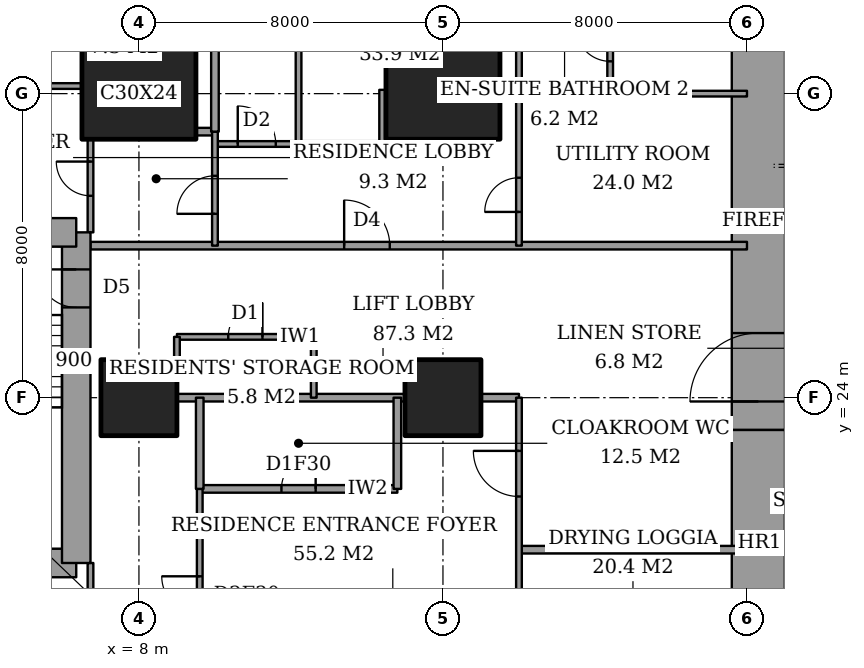
"""IFC4 building model, lengths in metres.
Left out: names, types, materials, properties, quantities, classifications, styles, units other than length and angle.
Written with IfcOpenShell. Run it as: python <this file> out.ifc"""

import sys

from ifc_helpers import new_model, si_unit, direction, frame, frame_2d, origin, origin_2d, place, context, subcontext, project, spatial, rectangle, extrude, element, fill, save


model = new_model("IFC4")
c1 = context("Model", 3, precision=1e-05, world=origin(), true_north=direction((0.0, 1.0)))
c2 = subcontext(c1, "Body", "Model", "MODEL_VIEW")
j1 = project(units=[si_unit("LENGTHUNIT", "METRE"), si_unit("PLANEANGLEUNIT", "RADIAN")], contexts=[c1])
p1 = place(None, origin())
s1 = spatial("IfcSite", under=j1, at=p1, CompositionType="ELEMENT")
p2 = place(p1, origin())
s2 = spatial("IfcBuilding", under=s1, at=p2, CompositionType="ELEMENT")
p3 = place(p2, frame((0.0, 0.0, 80.0)))
s3 = spatial("IfcBuildingStorey", under=s2, at=p3, CompositionType="ELEMENT", Elevation=80.0)
p4 = place(p3, frame((8.0, 24.0, 0.0), z_axis=(0.0, 0.0, 1.0), x_axis=(1.0, 0.0, 0.0)))
e1 = element("IfcColumn", 1, at=p4, inside=s3, PredefinedType="COLUMN", context=c2, shape_type="SweptSolid", body=[
    extrude(rectangle(XDim=2.0, YDim=2.0, at=origin_2d()), origin(), (0.0, 0.0, 1.0), 3.6),
])
p5 = place(p3, frame((8.0, 32.0, 0.0), z_axis=(0.0, 0.0, 1.0), x_axis=(1.0, 0.0, 0.0)))
e2 = element("IfcColumn", 2, at=p5, inside=s3, PredefinedType="COLUMN", context=c2, shape_type="SweptSolid", body=[
    extrude(rectangle(XDim=3.0, YDim=2.4, at=origin_2d()), origin(), (0.0, 0.0, 1.0), 3.6),
])
p6 = place(p3, frame((16.0, 24.0, 0.0), z_axis=(0.0, 0.0, 1.0), x_axis=(1.0, 0.0, 0.0)))
e3 = element("IfcColumn", 3, at=p6, inside=s3, PredefinedType="COLUMN", context=c2, shape_type="SweptSolid", body=[
    extrude(rectangle(XDim=2.0, YDim=2.0, at=origin_2d()), origin(), (0.0, 0.0, 1.0), 3.6),
])
p7 = place(p3, frame((16.0, 32.0, 0.0), z_axis=(0.0, 0.0, 1.0), x_axis=(1.0, 0.0, 0.0)))
e4 = element("IfcColumn", 4, at=p7, inside=s3, PredefinedType="COLUMN", context=c2, shape_type="SweptSolid", body=[
    extrude(rectangle(XDim=3.0, YDim=2.4, at=origin_2d()), origin(), (0.0, 0.0, 1.0), 3.6),
])
p8 = place(p3, frame((24.3, 13.0, 0.0), z_axis=(0.0, 0.0, 1.0), x_axis=(0.0, 1.0, 0.0)))
e5 = element("IfcWall", 5, at=p8, inside=s3, PredefinedType="SHEAR", context=c2, shape_type="SweptSolid", body=[
    extrude(rectangle(XDim=10.15, YDim=1.4, at=frame_2d((5.075, 0.0))), origin(), (0.0, 0.0, 1.0), 3.6),
])
p9 = place(p3, frame((24.3, 23.15, 0.0), z_axis=(0.0, 0.0, 1.0), x_axis=(0.0, 1.0, 0.0)))
e6 = element("IfcWall", 6, at=p9, inside=s3, PredefinedType="SHEAR", context=c2, shape_type="SweptSolid", body=[
    extrude(rectangle(XDim=11.85, YDim=1.4, at=frame_2d((5.925, 0.0))), origin(), (0.0, 0.0, 1.0), 3.6),
])
p10 = place(p9, frame((0.75, 0.0, 0.0)))
e7 = element("IfcOpeningElement", 7, at=p10, cuts=e6, PredefinedType="OPENING", context=c2, shape_type="SweptSolid", body=[
    extrude(rectangle(XDim=1.8, YDim=2.4, at=frame_2d((0.9, 1.2))), frame((0.0, 0.71, 0.0), z_axis=(0.0, -1.0, 0.0), x_axis=(1.0, 0.0, 0.0)), (0.0, 0.0, 1.0), 1.42),
])
p11 = place(p3, frame((1.9, 19.65, 0.0), z_axis=(0.0, 0.0, 1.0), x_axis=(1.0, 0.0, 0.0)))
e8 = element("IfcWall", 8, at=p11, inside=s3, PredefinedType="SHEAR", context=c2, shape_type="SweptSolid", body=[
    extrude(rectangle(XDim=4.45, YDim=0.75, at=frame_2d((2.225, 0.0))), origin(), (0.0, 0.0, 1.0), 3.6),
])
p12 = place(p3, frame((6.35, 19.65, 0.0), z_axis=(0.0, 0.0, 1.0), x_axis=(0.0, 1.0, 0.0)))
e9 = element("IfcWall", 9, at=p12, inside=s3, PredefinedType="SHEAR", context=c2, shape_type="SweptSolid", body=[
    extrude(rectangle(XDim=8.7, YDim=0.75, at=frame_2d((4.35, 0.0))), origin(), (0.0, 0.0, 1.0), 3.6),
])
p13 = place(p12, frame((6.725, 0.0, 0.0)))
e10 = element("IfcOpeningElement", 10, at=p13, cuts=e9, PredefinedType="OPENING", context=c2, shape_type="SweptSolid", body=[
    extrude(rectangle(XDim=1.0, YDim=2.1, at=frame_2d((0.5, 1.05))), frame((0.0, 0.385, 0.0), z_axis=(0.0, -1.0, 0.0), x_axis=(1.0, 0.0, 0.0)), (0.0, 0.0, 1.0), 0.77),
])
p14 = place(p3, frame((6.35, 28.35, 0.0), z_axis=(0.0, 0.0, 1.0), x_axis=(-1.0, 0.0, 0.0)))
e11 = element("IfcWall", 11, at=p14, inside=s3, PredefinedType="SHEAR", context=c2, shape_type="SweptSolid", body=[
    extrude(rectangle(XDim=4.45, YDim=0.75, at=frame_2d((2.225, 0.0))), origin(), (0.0, 0.0, 1.0), 3.6),
])
p15 = place(p3, frame((18.0, 20.0, 0.0), z_axis=(0.0, 0.0, 1.0), x_axis=(1.0, 0.0, 0.0)))
e12 = element("IfcWall", 12, at=p15, inside=s3, PredefinedType="PARTITIONING", context=c2, shape_type="SweptSolid", body=[
    extrude(rectangle(XDim=6.0, YDim=0.2, at=frame_2d((3.0, 0.0))), origin(), (0.0, 0.0, 1.0), 3.35),
])
p16 = place(p3, frame((9.6, 21.6, 0.0), z_axis=(0.0, 0.0, 1.0), x_axis=(1.0, 0.0, 0.0)))
e13 = element("IfcWall", 13, at=p16, inside=s3, PredefinedType="PARTITIONING", context=c2, shape_type="SweptSolid", body=[
    extrude(rectangle(XDim=5.2, YDim=0.2, at=frame_2d((2.6, 0.0))), origin(), (0.0, 0.0, 1.0), 3.35),
])
p17 = place(p16, frame((2.15, 0.0, 0.0)))
e14 = element("IfcOpeningElement", 14, at=p17, cuts=e13, PredefinedType="OPENING", context=c2, shape_type="SweptSolid", body=[
    extrude(rectangle(XDim=0.9, YDim=2.1, at=frame_2d((0.45, 1.05))), frame((0.0, 0.11, 0.0), z_axis=(0.0, -1.0, 0.0), x_axis=(1.0, 0.0, 0.0)), (0.0, 0.0, 1.0), 0.22),
])
p18 = place(p3, frame((9.0, 24.0, 0.0), z_axis=(0.0, 0.0, 1.0), x_axis=(1.0, 0.0, 0.0)))
e15 = element("IfcWall", 15, at=p18, inside=s3, PredefinedType="PARTITIONING", context=c2, shape_type="SweptSolid", body=[
    extrude(rectangle(XDim=6.0, YDim=0.2, at=frame_2d((3.0, 0.0))), origin(), (0.0, 0.0, 1.0), 3.35),
])
p19 = place(p3, frame((17.0, 24.0, 0.0), z_axis=(0.0, 0.0, 1.0), x_axis=(1.0, 0.0, 0.0)))
e16 = element("IfcWall", 16, at=p19, inside=s3, PredefinedType="PARTITIONING", context=c2, shape_type="SweptSolid", body=[
    extrude(rectangle(XDim=1.0, YDim=0.2, at=frame_2d((0.5, 0.0))), origin(), (0.0, 0.0, 1.0), 3.35),
])
p20 = place(p3, frame((9.0, 25.6, 0.0), z_axis=(0.0, 0.0, 1.0), x_axis=(1.0, 0.0, 0.0)))
e17 = element("IfcWall", 17, at=p20, inside=s3, PredefinedType="PARTITIONING", context=c2, shape_type="SweptSolid", body=[
    extrude(rectangle(XDim=3.6, YDim=0.15, at=frame_2d((1.8, 0.0))), origin(), (0.0, 0.0, 1.0), 3.35),
])
p21 = place(p20, frame((1.35, 0.0, 0.0)))
e18 = element("IfcOpeningElement", 18, at=p21, cuts=e17, PredefinedType="OPENING", context=c2, shape_type="SweptSolid", body=[
    extrude(rectangle(XDim=0.9, YDim=2.1, at=frame_2d((0.45, 1.05))), frame((0.0, 0.085, 0.0), z_axis=(0.0, -1.0, 0.0), x_axis=(1.0, 0.0, 0.0)), (0.0, 0.0, 1.0), 0.17),
])
p22 = place(p3, frame((6.725, 28.0, 0.0), z_axis=(0.0, 0.0, 1.0), x_axis=(1.0, 0.0, 0.0)))
e19 = element("IfcWall", 19, at=p22, inside=s3, PredefinedType="PARTITIONING", context=c2, shape_type="SweptSolid", body=[
    extrude(rectangle(XDim=17.275, YDim=0.2, at=frame_2d((8.637, 0.0))), origin(), (0.0, 0.0, 1.0), 3.35),
])
p23 = place(p22, frame((6.675, 0.0, 0.0)))
e20 = element("IfcOpeningElement", 20, at=p23, cuts=e19, PredefinedType="OPENING", context=c2, shape_type="SweptSolid", body=[
    extrude(rectangle(XDim=1.2, YDim=2.4, at=frame_2d((0.6, 1.2))), frame((0.0, 0.11, 0.0), z_axis=(0.0, -1.0, 0.0), x_axis=(1.0, 0.0, 0.0)), (0.0, 0.0, 1.0), 0.22),
])
p24 = place(p3, frame((10.0, 30.675, 0.0), z_axis=(0.0, 0.0, 1.0), x_axis=(1.0, 0.0, 0.0)))
e21 = element("IfcWall", 21, at=p24, inside=s3, PredefinedType="PARTITIONING", context=c2, shape_type="SweptSolid", body=[
    extrude(rectangle(XDim=4.4, YDim=0.15, at=frame_2d((2.2, 0.0))), origin(), (0.0, 0.0, 1.0), 3.35),
])
p25 = place(p24, frame((0.6, 0.0, 0.0)))
e22 = element("IfcOpeningElement", 22, at=p25, cuts=e21, PredefinedType="OPENING", context=c2, shape_type="SweptSolid", body=[
    extrude(rectangle(XDim=1.0, YDim=2.1, at=frame_2d((0.5, 1.05))), frame((0.0, 0.085, 0.0), z_axis=(0.0, -1.0, 0.0), x_axis=(1.0, 0.0, 0.0)), (0.0, 0.0, 1.0), 0.17),
])
p26 = place(p3, frame((9.5, 31.0, 0.0), z_axis=(0.0, 0.0, 1.0), x_axis=(1.0, 0.0, 0.0)))
e23 = element("IfcWall", 23, at=p26, inside=s3, PredefinedType="PARTITIONING", context=c2, shape_type="SweptSolid", body=[
    extrude(rectangle(XDim=0.5, YDim=0.2, at=frame_2d((0.25, 0.0))), origin(), (0.0, 0.0, 1.0), 3.35),
])
p27 = place(p3, frame((18.0, 32.0, 0.0), z_axis=(0.0, 0.0, 1.0), x_axis=(1.0, 0.0, 0.0)))
e24 = element("IfcWall", 24, at=p27, inside=s3, PredefinedType="PARTITIONING", context=c2, shape_type="SweptSolid", body=[
    extrude(rectangle(XDim=6.0, YDim=0.15, at=frame_2d((3.0, 0.0))), origin(), (0.0, 0.0, 1.0), 2.634),
])
p28 = place(p3, frame((17.5, 32.1, 0.0), z_axis=(0.0, 0.0, 1.0), x_axis=(1.0, 0.0, 0.0)))
e25 = element("IfcWall", 25, at=p28, inside=s3, PredefinedType="PARTITIONING", context=c2, shape_type="SweptSolid", body=[
    extrude(rectangle(XDim=0.5, YDim=0.15, at=frame_2d((0.25, 0.0))), origin(), (0.0, 0.0, 1.0), 2.634),
])
p29 = place(p3, frame((1.35, 32.2, 0.0), z_axis=(0.0, 0.0, 1.0), x_axis=(1.0, 0.0, 0.0)))
e26 = element("IfcWall", 26, at=p29, inside=s3, PredefinedType="PARTITIONING", context=c2, shape_type="SweptSolid", body=[
    extrude(rectangle(XDim=5.15, YDim=0.15, at=frame_2d((2.575, 0.0))), origin(), (0.0, 0.0, 1.0), 3.35),
])
p30 = place(p3, frame((6.725, 17.2, 0.0), z_axis=(0.0, 0.0, 1.0), x_axis=(0.0, 1.0, 0.0)))
e27 = element("IfcWall", 27, at=p30, inside=s3, PredefinedType="PARTITIONING", context=c2, shape_type="SweptSolid", body=[
    extrude(rectangle(XDim=2.45, YDim=0.15, at=frame_2d((1.225, 0.0))), origin(), (0.0, 0.0, 1.0), 3.35),
])
p31 = place(p30, frame((0.538, 0.0, 0.0)))
e28 = element("IfcOpeningElement", 28, at=p31, cuts=e27, PredefinedType="OPENING", context=c2, shape_type="SweptSolid", body=[
    extrude(rectangle(XDim=1.0, YDim=2.1, at=frame_2d((0.5, 1.05))), frame((0.0, 0.085, 0.0), z_axis=(0.0, -1.0, 0.0), x_axis=(1.0, 0.0, 0.0)), (0.0, 0.0, 1.0), 0.17),
])
p32 = place(p3, frame((6.725, 28.35, 0.0), z_axis=(0.0, 0.0, 1.0), x_axis=(0.0, 1.0, 0.0)))
e29 = element("IfcWall", 29, at=p32, inside=s3, PredefinedType="PARTITIONING", context=c2, shape_type="SweptSolid", body=[
    extrude(rectangle(XDim=2.45, YDim=0.15, at=frame_2d((1.225, 0.0))), origin(), (0.0, 0.0, 1.0), 3.35),
])
p33 = place(p32, frame((0.962, 0.0, 0.0)))
e30 = element("IfcOpeningElement", 30, at=p33, cuts=e29, PredefinedType="OPENING", context=c2, shape_type="SweptSolid", body=[
    extrude(rectangle(XDim=0.9, YDim=2.1, at=frame_2d((0.45, 1.05))), frame((0.0, 0.085, 0.0), z_axis=(0.0, -1.0, 0.0), x_axis=(1.0, 0.0, 0.0)), (0.0, 0.0, 1.0), 0.17),
])
p34 = place(p3, frame((9.0, 25.0, 0.0), z_axis=(0.0, 0.0, 1.0), x_axis=(0.0, 1.0, 0.0)))
e31 = element("IfcWall", 31, at=p34, inside=s3, PredefinedType="PARTITIONING", context=c2, shape_type="SweptSolid", body=[
    extrude(rectangle(XDim=0.6, YDim=0.15, at=frame_2d((0.3, 0.0))), origin(), (0.0, 0.0, 1.0), 3.35),
])
p35 = place(p3, frame((9.6, 21.6, 0.0), z_axis=(0.0, 0.0, 1.0), x_axis=(0.0, 1.0, 0.0)))
e32 = element("IfcWall", 32, at=p35, inside=s3, PredefinedType="PARTITIONING", context=c2, shape_type="SweptSolid", body=[
    extrude(rectangle(XDim=2.4, YDim=0.2, at=frame_2d((1.2, 0.0))), origin(), (0.0, 0.0, 1.0), 3.35),
])
p36 = place(p3, frame((9.6, 10.6, 0.0), z_axis=(0.0, 0.0, 1.0), x_axis=(0.0, 1.0, 0.0)))
e33 = element("IfcWall", 33, at=p36, inside=s3, PredefinedType="PARTITIONING", context=c2, shape_type="SweptSolid", body=[
    extrude(rectangle(XDim=11.0, YDim=0.15, at=frame_2d((5.5, 0.0))), origin(), (0.0, 0.0, 1.0), 3.35),
])
p37 = place(p36, frame((7.7, 0.0, 0.0)))
e34 = element("IfcOpeningElement", 34, at=p37, cuts=e33, PredefinedType="OPENING", context=c2, shape_type="SweptSolid", body=[
    extrude(rectangle(XDim=1.0, YDim=2.1, at=frame_2d((0.5, 1.05))), frame((0.0, 0.085, 0.0), z_axis=(0.0, -1.0, 0.0), x_axis=(1.0, 0.0, 0.0)), (0.0, 0.0, 1.0), 0.17),
])
p38 = place(p3, frame((10.0, 31.0, 0.0), z_axis=(0.0, 0.0, 1.0), x_axis=(0.0, 1.0, 0.0)))
e35 = element("IfcWall", 35, at=p38, inside=s3, PredefinedType="PARTITIONING", context=c2, shape_type="SweptSolid", body=[
    extrude(rectangle(XDim=6.4, YDim=0.2, at=frame_2d((3.2, 0.0))), origin(), (0.0, 0.0, 1.0), 3.35),
])
p39 = place(p3, frame((10.0, 28.0, 0.0), z_axis=(0.0, 0.0, 1.0), x_axis=(0.0, 1.0, 0.0)))
e36 = element("IfcWall", 36, at=p39, inside=s3, PredefinedType="PARTITIONING", context=c2, shape_type="SweptSolid", body=[
    extrude(rectangle(XDim=3.0, YDim=0.15, at=frame_2d((1.5, 0.0))), origin(), (0.0, 0.0, 1.0), 3.35),
])
p40 = place(p39, frame((0.837, 0.0, 0.0)))
e37 = element("IfcOpeningElement", 37, at=p40, cuts=e36, PredefinedType="OPENING", context=c2, shape_type="SweptSolid", body=[
    extrude(rectangle(XDim=1.0, YDim=2.1, at=frame_2d((0.5, 1.05))), frame((0.0, 0.085, 0.0), z_axis=(0.0, -1.0, 0.0), x_axis=(1.0, 0.0, 0.0)), (0.0, 0.0, 1.0), 0.17),
])
p41 = place(p3, frame((12.2, 30.675, 0.0), z_axis=(0.0, 0.0, 1.0), x_axis=(0.0, 1.0, 0.0)))
e38 = element("IfcWall", 38, at=p41, inside=s3, PredefinedType="PARTITIONING", context=c2, shape_type="SweptSolid", body=[
    extrude(rectangle(XDim=6.725, YDim=0.15, at=frame_2d((3.362, 0.0))), origin(), (0.0, 0.0, 1.0), 3.35),
])
p42 = place(p3, frame((12.6, 24.0, 0.0), z_axis=(0.0, 0.0, 1.0), x_axis=(0.0, 1.0, 0.0)))
e39 = element("IfcWall", 39, at=p42, inside=s3, PredefinedType="PARTITIONING", context=c2, shape_type="SweptSolid", body=[
    extrude(rectangle(XDim=1.6, YDim=0.15, at=frame_2d((0.8, 0.0))), origin(), (0.0, 0.0, 1.0), 3.35),
])
p43 = place(p3, frame((14.4, 30.675, 0.0), z_axis=(0.0, 0.0, 1.0), x_axis=(0.0, 1.0, 0.0)))
e40 = element("IfcWall", 40, at=p43, inside=s3, PredefinedType="PARTITIONING", context=c2, shape_type="SweptSolid", body=[
    extrude(rectangle(XDim=1.425, YDim=0.15, at=frame_2d((0.712, 0.0))), origin(), (0.0, 0.0, 1.0), 3.35),
])
p44 = place(p3, frame((14.8, 21.6, 0.0), z_axis=(0.0, 0.0, 1.0), x_axis=(0.0, 1.0, 0.0)))
e41 = element("IfcWall", 41, at=p44, inside=s3, PredefinedType="PARTITIONING", context=c2, shape_type="SweptSolid", body=[
    extrude(rectangle(XDim=2.4, YDim=0.2, at=frame_2d((1.2, 0.0))), origin(), (0.0, 0.0, 1.0), 3.35),
])
p45 = place(p3, frame((18.0, 10.6, 0.0), z_axis=(0.0, 0.0, 1.0), x_axis=(0.0, 1.0, 0.0)))
e42 = element("IfcWall", 42, at=p45, inside=s3, PredefinedType="PARTITIONING", context=c2, shape_type="SweptSolid", body=[
    extrude(rectangle(XDim=13.4, YDim=0.15, at=frame_2d((6.7, 0.0))), origin(), (0.0, 0.0, 1.0), 3.35),
])
p46 = place(p45, frame((10.8, 0.0, 0.0)))
e43 = element("IfcOpeningElement", 43, at=p46, cuts=e42, PredefinedType="OPENING", context=c2, shape_type="SweptSolid", body=[
    extrude(rectangle(XDim=1.2, YDim=2.4, at=frame_2d((0.6, 1.2))), frame((0.0, 0.085, 0.0), z_axis=(0.0, -1.0, 0.0), x_axis=(1.0, 0.0, 0.0)), (0.0, 0.0, 1.0), 0.17),
])
p47 = place(p45, frame((7.25, 0.0, 0.0)))
e44 = element("IfcOpeningElement", 44, at=p47, cuts=e42, PredefinedType="OPENING", context=c2, shape_type="SweptSolid", body=[
    extrude(rectangle(XDim=0.9, YDim=2.1, at=frame_2d((0.45, 1.05))), frame((0.0, 0.085, 0.0), z_axis=(0.0, -1.0, 0.0), x_axis=(1.0, 0.0, 0.0)), (0.0, 0.0, 1.0), 0.17),
])
p48 = place(p3, frame((18.0, 28.0, 0.0), z_axis=(0.0, 0.0, 1.0), x_axis=(0.0, 1.0, 0.0)))
e45 = element("IfcWall", 45, at=p48, inside=s3, PredefinedType="PARTITIONING", context=c2, shape_type="SweptSolid", body=[
    extrude(rectangle(XDim=9.4, YDim=0.15, at=frame_2d((4.7, 0.0))), origin(), (0.0, 0.0, 1.0), 3.35),
])
p49 = place(p48, frame((0.887, 0.0, 0.0)))
e46 = element("IfcOpeningElement", 46, at=p49, cuts=e45, PredefinedType="OPENING", context=c2, shape_type="SweptSolid", body=[
    extrude(rectangle(XDim=0.9, YDim=2.1, at=frame_2d((0.45, 1.05))), frame((0.0, 0.085, 0.0), z_axis=(0.0, -1.0, 0.0), x_axis=(1.0, 0.0, 0.0)), (0.0, 0.0, 1.0), 0.17),
])
p50 = place(p3, frame((20.4, 32.0, 0.0), z_axis=(0.0, 0.0, 1.0), x_axis=(0.0, 1.0, 0.0)))
e47 = element("IfcWall", 47, at=p50, inside=s3, PredefinedType="PARTITIONING", context=c2, shape_type="SweptSolid", body=[
    extrude(rectangle(XDim=2.6, YDim=0.15, at=frame_2d((1.3, 0.0))), origin(), (0.0, 0.0, 1.0), 3.35),
])
p51 = place(p50, frame((0.85, 0.0, 0.0)))
e48 = element("IfcOpeningElement", 48, at=p51, cuts=e47, PredefinedType="OPENING", context=c2, shape_type="SweptSolid", body=[
    extrude(rectangle(XDim=0.9, YDim=2.1, at=frame_2d((0.45, 1.05))), frame((0.0, 0.085, 0.0), z_axis=(0.0, -1.0, 0.0), x_axis=(1.0, 0.0, 0.0)), (0.0, 0.0, 1.0), 0.17),
])
p52 = place(p37, origin())
e49 = element("IfcDoor", 49, at=p52, inside=s3, OperationType="SINGLE_SWING_LEFT", PredefinedType="DOOR", context=c2, shape_type="SweptSolid", body=[
    extrude(rectangle(XDim=1.0, YDim=2.1, at=frame_2d((0.5, 1.05))), frame((0.0, 0.025, 0.0), z_axis=(0.0, -1.0, 0.0), x_axis=(1.0, 0.0, 0.0)), (0.0, 0.0, 1.0), 0.05),
])
fill(e34, e49)
p53 = place(p17, origin())
e50 = element("IfcDoor", 50, at=p53, inside=s3, OperationType="SINGLE_SWING_LEFT", PredefinedType="DOOR", context=c2, shape_type="SweptSolid", body=[
    extrude(rectangle(XDim=0.9, YDim=2.1, at=frame_2d((0.45, 1.05))), frame((0.0, 0.025, 0.0), z_axis=(0.0, -1.0, 0.0), x_axis=(1.0, 0.0, 0.0)), (0.0, 0.0, 1.0), 0.05),
])
fill(e14, e50)
p54 = place(p46, origin())
e51 = element("IfcDoor", 51, at=p54, inside=s3, OperationType="SINGLE_SWING_LEFT", PredefinedType="DOOR", context=c2, shape_type="SweptSolid", body=[
    extrude(rectangle(XDim=1.2, YDim=2.4, at=frame_2d((0.6, 1.2))), frame((0.0, 0.025, 0.0), z_axis=(0.0, -1.0, 0.0), x_axis=(1.0, 0.0, 0.0)), (0.0, 0.0, 1.0), 0.05),
])
fill(e43, e51)
p55 = place(p33, origin())
e52 = element("IfcDoor", 52, at=p55, inside=s3, OperationType="SINGLE_SWING_LEFT", PredefinedType="DOOR", context=c2, shape_type="SweptSolid", body=[
    extrude(rectangle(XDim=0.9, YDim=2.1, at=frame_2d((0.45, 1.05))), frame((0.0, 0.025, 0.0), z_axis=(0.0, -1.0, 0.0), x_axis=(1.0, 0.0, 0.0)), (0.0, 0.0, 1.0), 0.05),
])
fill(e30, e52)
p56 = place(p40, origin())
e53 = element("IfcDoor", 53, at=p56, inside=s3, OperationType="SINGLE_SWING_RIGHT", PredefinedType="DOOR", context=c2, shape_type="SweptSolid", body=[
    extrude(rectangle(XDim=1.0, YDim=2.1, at=frame_2d((0.5, 1.05))), frame((0.0, 0.025, 0.0), z_axis=(0.0, -1.0, 0.0), x_axis=(1.0, 0.0, 0.0)), (0.0, 0.0, 1.0), 0.05),
])
fill(e37, e53)
p57 = place(p23, origin())
e54 = element("IfcDoor", 54, at=p57, inside=s3, OperationType="SINGLE_SWING_RIGHT", PredefinedType="DOOR", context=c2, shape_type="SweptSolid", body=[
    extrude(rectangle(XDim=1.2, YDim=2.4, at=frame_2d((0.6, 1.2))), frame((0.0, 0.025, 0.0), z_axis=(0.0, -1.0, 0.0), x_axis=(1.0, 0.0, 0.0)), (0.0, 0.0, 1.0), 0.05),
])
fill(e20, e54)
p58 = place(p25, origin())
e55 = element("IfcDoor", 55, at=p58, inside=s3, OperationType="SINGLE_SWING_RIGHT", PredefinedType="DOOR", context=c2, shape_type="SweptSolid", body=[
    extrude(rectangle(XDim=1.0, YDim=2.1, at=frame_2d((0.5, 1.05))), frame((0.0, 0.025, 0.0), z_axis=(0.0, -1.0, 0.0), x_axis=(1.0, 0.0, 0.0)), (0.0, 0.0, 1.0), 0.05),
])
fill(e22, e55)
p59 = place(p51, origin())
e56 = element("IfcDoor", 56, at=p59, inside=s3, OperationType="SINGLE_SWING_LEFT", PredefinedType="DOOR", context=c2, shape_type="SweptSolid", body=[
    extrude(rectangle(XDim=0.9, YDim=2.1, at=frame_2d((0.45, 1.05))), frame((0.0, 0.025, 0.0), z_axis=(0.0, -1.0, 0.0), x_axis=(1.0, 0.0, 0.0)), (0.0, 0.0, 1.0), 0.05),
])
fill(e48, e56)
p60 = place(p49, origin())
e57 = element("IfcDoor", 57, at=p60, inside=s3, OperationType="SINGLE_SWING_RIGHT", PredefinedType="DOOR", context=c2, shape_type="SweptSolid", body=[
    extrude(rectangle(XDim=0.9, YDim=2.1, at=frame_2d((0.45, 1.05))), frame((0.0, 0.025, 0.0), z_axis=(0.0, -1.0, 0.0), x_axis=(1.0, 0.0, 0.0)), (0.0, 0.0, 1.0), 0.05),
])
fill(e46, e57)
p61 = place(p21, origin())
e58 = element("IfcDoor", 58, at=p61, inside=s3, OperationType="SINGLE_SWING_LEFT", PredefinedType="DOOR", context=c2, shape_type="SweptSolid", body=[
    extrude(rectangle(XDim=0.9, YDim=2.1, at=frame_2d((0.45, 1.05))), frame((0.0, 0.025, 0.0), z_axis=(0.0, -1.0, 0.0), x_axis=(1.0, 0.0, 0.0)), (0.0, 0.0, 1.0), 0.05),
])
fill(e18, e58)
p62 = place(p10, origin())
e59 = element("IfcDoor", 59, at=p62, inside=s3, OperationType="DOUBLE_DOOR_DOUBLE_SWING", PredefinedType="DOOR", context=c2, shape_type="SweptSolid", body=[
    extrude(rectangle(XDim=1.8, YDim=2.4, at=frame_2d((0.9, 1.2))), frame((0.0, 0.025, 0.0), z_axis=(0.0, -1.0, 0.0), x_axis=(1.0, 0.0, 0.0)), (0.0, 0.0, 1.0), 0.05),
])
fill(e7, e59)
p63 = place(p13, origin())
e60 = element("IfcDoor", 60, at=p63, inside=s3, OperationType="SINGLE_SWING_LEFT", PredefinedType="DOOR", context=c2, shape_type="SweptSolid", body=[
    extrude(rectangle(XDim=1.0, YDim=2.1, at=frame_2d((0.5, 1.05))), frame((0.0, 0.025, 0.0), z_axis=(0.0, -1.0, 0.0), x_axis=(1.0, 0.0, 0.0)), (0.0, 0.0, 1.0), 0.05),
])
fill(e10, e60)
save(model, sys.argv[1])
